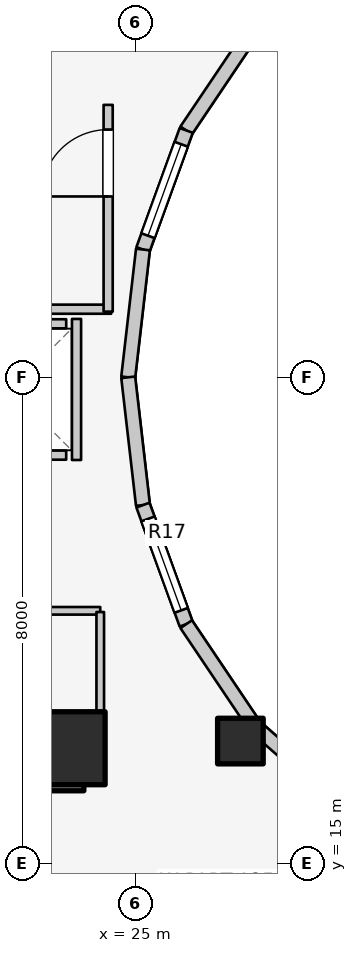
"""IFC4 building model, lengths in metres.
Left out: names, types, materials, properties, quantities, classifications, styles, units other than length and angle.
Written with IfcOpenShell. Run it as: python <this file> out.ifc"""

import sys

from ifc_helpers import new_model, si_unit, direction, frame, frame_2d, origin, origin_2d, place, context, subcontext, project, spatial, rectangle, extrude, element, fill, save


model = new_model("IFC4")
c1 = context("Model", 3, precision=1e-05, world=origin(), true_north=direction((0.0, 1.0)))
c2 = subcontext(c1, "Body", "Model", "MODEL_VIEW")
j1 = project(units=[si_unit("LENGTHUNIT", "METRE"), si_unit("PLANEANGLEUNIT", "RADIAN")], contexts=[c1])
p1 = place(None, origin())
s1 = spatial("IfcSite", under=j1, at=p1, CompositionType="ELEMENT")
p2 = place(p1, origin())
s2 = spatial("IfcBuilding", under=s1, at=p2, CompositionType="ELEMENT")
p3 = place(p2, frame((0.0, 0.0, 146.7)))
s3 = spatial("IfcBuildingStorey", under=s2, at=p3, CompositionType="ELEMENT", Elevation=146.7)
p4 = place(p3, frame((19.65, 16.55, 0.0), z_axis=(0.0, 0.0, 1.0), x_axis=(1.0, 0.0, 0.0)))
e1 = element("IfcWall", 1, at=p4, inside=s3, PredefinedType="SHEAR", context=c2, shape_type="SweptSolid", body=[
    extrude(rectangle(XDim=4.5, YDim=0.7, at=frame_2d((2.25, 0.0))), origin(), (0.0, 0.0, 1.0), 3.1),
])
p5 = place(p3, frame((23.9, 16.9, 0.0), z_axis=(0.0, 0.0, 1.0), x_axis=(1.0, 0.0, 0.0)))
e2 = element("IfcColumn", 2, at=p5, inside=s3, PredefinedType="COLUMN", context=c2, shape_type="SweptSolid", body=[
    extrude(rectangle(XDim=1.2, YDim=1.2, at=origin_2d()), origin(), (0.0, 0.0, 1.0), 3.1),
])
p6 = place(p3, frame((26.725, 17.018, 0.0), z_axis=(0.0, 0.0, 1.0), x_axis=(1.0, 0.0, 0.0)))
e3 = element("IfcColumn", 3, at=p6, inside=s3, PredefinedType="COLUMN", context=c2, shape_type="SweptSolid", body=[
    extrude(rectangle(XDim=0.75, YDim=0.75, at=origin_2d()), origin(), (0.0, 0.0, 1.0), 3.1),
])
p7 = place(p3, frame((26.965, 28.742, 0.0), z_axis=(0.0, 0.0, 1.0), x_axis=(-0.558197800898, -0.829707909492, 0.0)))
e4 = element("IfcWall", 4, at=p7, inside=s3, PredefinedType="STANDARD", context=c2, shape_type="SweptSolid", body=[
    extrude(rectangle(XDim=2.027, YDim=0.23, at=frame_2d((1.013, 0.0))), origin(), (0.0, 0.0, 1.0), 2.16),
])
p8 = place(p3, frame((25.834, 27.06, 0.0), z_axis=(0.0, 0.0, 1.0), x_axis=(-0.341423187295, -0.93990968033, 0.0)))
e5 = element("IfcWall", 5, at=p8, inside=s3, PredefinedType="STANDARD", context=c2, shape_type="SweptSolid", body=[
    extrude(rectangle(XDim=2.084, YDim=0.23, at=frame_2d((1.042, 0.0))), origin(), (0.0, 0.0, 1.0), 2.84),
])
p9 = place(p8, frame((0.242, 0.0, 0.85)))
e6 = element("IfcOpeningElement", 6, at=p9, cuts=e5, PredefinedType="OPENING", context=c2, shape_type="SweptSolid", body=[
    extrude(rectangle(XDim=1.6, YDim=1.65, at=frame_2d((0.8, 0.825))), frame((0.0, 0.125, 0.0), z_axis=(0.0, -1.0, 0.0), x_axis=(1.0, 0.0, 0.0)), (0.0, 0.0, 1.0), 0.25),
])
for number, where, z_axis, x_axis in (
    (7, (25.123, 25.102, 0.0), (0.0, 0.0, 1.0), (-0.115, -0.993, 0.0)),
    (8, (24.88, 23.0, 0.0), (0.0, 0.0, 1.0), (0.115, -0.993, 0.0)),
):
    element("IfcWall", number, at=place(p3, frame(where, z_axis=z_axis, x_axis=x_axis)), inside=s3, PredefinedType="STANDARD", context=c2, shape_type="SweptSolid", body=[
        extrude(rectangle(XDim=2.115, YDim=0.23, at=frame_2d((1.058, 0.0))), origin(), (0.0, 0.0, 1.0), 2.84),
    ])
p10 = place(p3, frame((25.123, 20.898, 0.0), z_axis=(0.0, 0.0, 1.0), x_axis=(0.341423187295, -0.93990968033, 0.0)))
e9 = element("IfcWall", 9, at=p10, inside=s3, PredefinedType="STANDARD", context=c2, shape_type="SweptSolid", body=[
    extrude(rectangle(XDim=2.084, YDim=0.23, at=frame_2d((1.042, 0.0))), origin(), (0.0, 0.0, 1.0), 2.84),
])
p11 = place(p10, frame((0.242, 0.0, 0.85)))
e10 = element("IfcOpeningElement", 10, at=p11, cuts=e9, PredefinedType="OPENING", context=c2, shape_type="SweptSolid", body=[
    extrude(rectangle(XDim=1.6, YDim=1.65, at=frame_2d((0.8, 0.825))), frame((0.0, 0.125, 0.0), z_axis=(0.0, -1.0, 0.0), x_axis=(1.0, 0.0, 0.0)), (0.0, 0.0, 1.0), 0.25),
])
p12 = place(p3, frame((25.834, 18.94, 0.0), z_axis=(0.0, 0.0, 1.0), x_axis=(0.558197800898, -0.829707909492, 0.0)))
e11 = element("IfcWall", 11, at=p12, inside=s3, PredefinedType="STANDARD", context=c2, shape_type="SweptSolid", body=[
    extrude(rectangle(XDim=2.027, YDim=0.23, at=frame_2d((1.013, 0.0))), origin(), (0.0, 0.0, 1.0), 2.16),
])
p13 = place(p3, frame((26.965, 17.258, 0.0), z_axis=(0.0, 0.0, 1.0), x_axis=(0.752576694707, -0.658504607869, 0.0)))
e12 = element("IfcWall", 12, at=p13, inside=s3, PredefinedType="STANDARD", context=c2, shape_type="SweptSolid", body=[
    extrude(rectangle(XDim=1.959, YDim=0.23, at=frame_2d((0.98, 0.0))), origin(), (0.0, 0.0, 1.0), 2.16),
])
for number, where, z_axis, x_axis in (
    (13, (22.04, 21.72, 0.0), (0.0, 0.0, 1.0), (1.0, 0.0, 0.0)),
    (14, (22.04, 23.88, 0.0), (0.0, 0.0, 1.0), (1.0, 0.0, 0.0)),
):
    element("IfcWall", number, at=place(p3, frame(where, z_axis=z_axis, x_axis=x_axis)), inside=s3, PredefinedType="SOLIDWALL", context=c2, shape_type="SweptSolid", body=[
        extrude(rectangle(XDim=1.82, YDim=0.15, at=frame_2d((0.91, 0.0))), origin(), (0.0, 0.0, 1.0), 2.12),
    ])
p14 = place(p3, frame((24.03, 21.64, 0.0), z_axis=(0.0, 0.0, 1.0), x_axis=(0.0, 1.0, 0.0)))
e15 = element("IfcWall", 15, at=p14, inside=s3, PredefinedType="SOLIDWALL", context=c2, shape_type="SweptSolid", body=[
    extrude(rectangle(XDim=2.32, YDim=0.15, at=frame_2d((1.16, 0.0))), origin(), (0.0, 0.0, 1.0), 2.12),
])
p15 = place(p3, frame((19.52, 24.12, 0.0), z_axis=(0.0, 0.0, 1.0), x_axis=(1.0, 0.0, 0.0)))
e16 = element("IfcWall", 16, at=p15, inside=s3, PredefinedType="PARTITIONING", context=c2, shape_type="SweptSolid", body=[
    extrude(rectangle(XDim=5.08, YDim=0.15, at=frame_2d((2.54, 0.0))), origin(), (0.0, 0.0, 1.0), 2.12),
])
p16 = place(p3, frame((24.55, 24.08, 0.0), z_axis=(0.0, 0.0, 1.0), x_axis=(0.0, 1.0, 0.0)))
e17 = element("IfcWall", 17, at=p16, inside=s3, PredefinedType="PARTITIONING", context=c2, shape_type="SweptSolid", body=[
    extrude(rectangle(XDim=3.4, YDim=0.15, at=frame_2d((1.7, 0.0))), origin(), (0.0, 0.0, 1.0), 2.855),
])
p17 = place(p16, frame((1.894, 0.0, 0.0)))
e18 = element("IfcOpeningElement", 18, at=p17, cuts=e17, PredefinedType="OPENING", context=c2, shape_type="SweptSolid", body=[
    extrude(rectangle(XDim=1.1, YDim=2.1, at=frame_2d((0.55, 1.05))), frame((0.0, 0.085, 0.0), z_axis=(0.0, -1.0, 0.0), x_axis=(1.0, 0.0, 0.0)), (0.0, 0.0, 1.0), 0.17),
])
p18 = place(p3, frame((19.55, 19.16, 0.0), z_axis=(0.0, 0.0, 1.0), x_axis=(1.0, 0.0, 0.0)))
e19 = element("IfcWall", 19, at=p18, inside=s3, PredefinedType="PARTITIONING", context=c2, shape_type="SweptSolid", body=[
    extrude(rectangle(XDim=4.87, YDim=0.125, at=frame_2d((2.435, 0.0))), origin(), (0.0, 0.0, 1.0), 2.12),
])
p19 = place(p18, frame((0.55, 0.0, 0.0)))
e20 = element("IfcOpeningElement", 20, at=p19, cuts=e19, PredefinedType="OPENING", context=c2, shape_type="SweptSolid", body=[
    extrude(rectangle(XDim=0.85, YDim=2.05, at=frame_2d((0.425, 1.025))), frame((0.0, 0.073, 0.0), z_axis=(0.0, -1.0, 0.0), x_axis=(1.0, 0.0, 0.0)), (0.0, 0.0, 1.0), 0.145),
])
p20 = place(p3, frame((24.42, 17.1, 0.0), z_axis=(0.0, 0.0, 1.0), x_axis=(0.0, 1.0, 0.0)))
e21 = element("IfcWall", 21, at=p20, inside=s3, PredefinedType="PARTITIONING", context=c2, shape_type="SweptSolid", body=[
    extrude(rectangle(XDim=2.04, YDim=0.125, at=frame_2d((1.02, 0.0))), origin(), (0.0, 0.0, 1.0), 2.232),
])
p21 = place(p3, frame((28.45, 15.985, 0.0), z_axis=(0.0, 0.0, 1.0), x_axis=(-0.524565340045, -0.851370192116, 0.0)))
e22 = element("IfcWall", 22, at=p21, inside=s3, PredefinedType="PARTITIONING", context=c2, shape_type="SweptSolid", body=[
    extrude(rectangle(XDim=3.027, YDim=0.125, at=frame_2d((1.514, 0.0))), origin(), (0.0, 0.0, 1.0), 2.299),
])
p22 = place(p9, origin())
e23 = element("IfcWindow", 23, at=p22, inside=s3, PartitioningType="SINGLE_PANEL", PredefinedType="WINDOW", context=c2, shape_type="SweptSolid", body=[
    extrude(rectangle(XDim=1.6, YDim=1.65, at=frame_2d((0.8, 0.825))), frame((0.0, 0.03, 0.0), z_axis=(0.0, -1.0, 0.0), x_axis=(1.0, 0.0, 0.0)), (0.0, 0.0, 1.0), 0.06),
])
fill(e6, e23)
p23 = place(p11, origin())
e24 = element("IfcWindow", 24, at=p23, inside=s3, PartitioningType="SINGLE_PANEL", PredefinedType="WINDOW", context=c2, shape_type="SweptSolid", body=[
    extrude(rectangle(XDim=1.6, YDim=1.65, at=frame_2d((0.8, 0.825))), frame((0.0, 0.03, 0.0), z_axis=(0.0, -1.0, 0.0), x_axis=(1.0, 0.0, 0.0)), (0.0, 0.0, 1.0), 0.06),
])
fill(e10, e24)
p24 = place(p17, origin())
e25 = element("IfcDoor", 25, at=p24, inside=s3, OperationType="SINGLE_SWING_LEFT", PredefinedType="DOOR", context=c2, shape_type="SweptSolid", body=[
    extrude(rectangle(XDim=1.1, YDim=2.1, at=frame_2d((0.55, 1.05))), frame((0.0, 0.025, 0.0), z_axis=(0.0, -1.0, 0.0), x_axis=(1.0, 0.0, 0.0)), (0.0, 0.0, 1.0), 0.05),
])
fill(e18, e25)
save(model, sys.argv[1])
